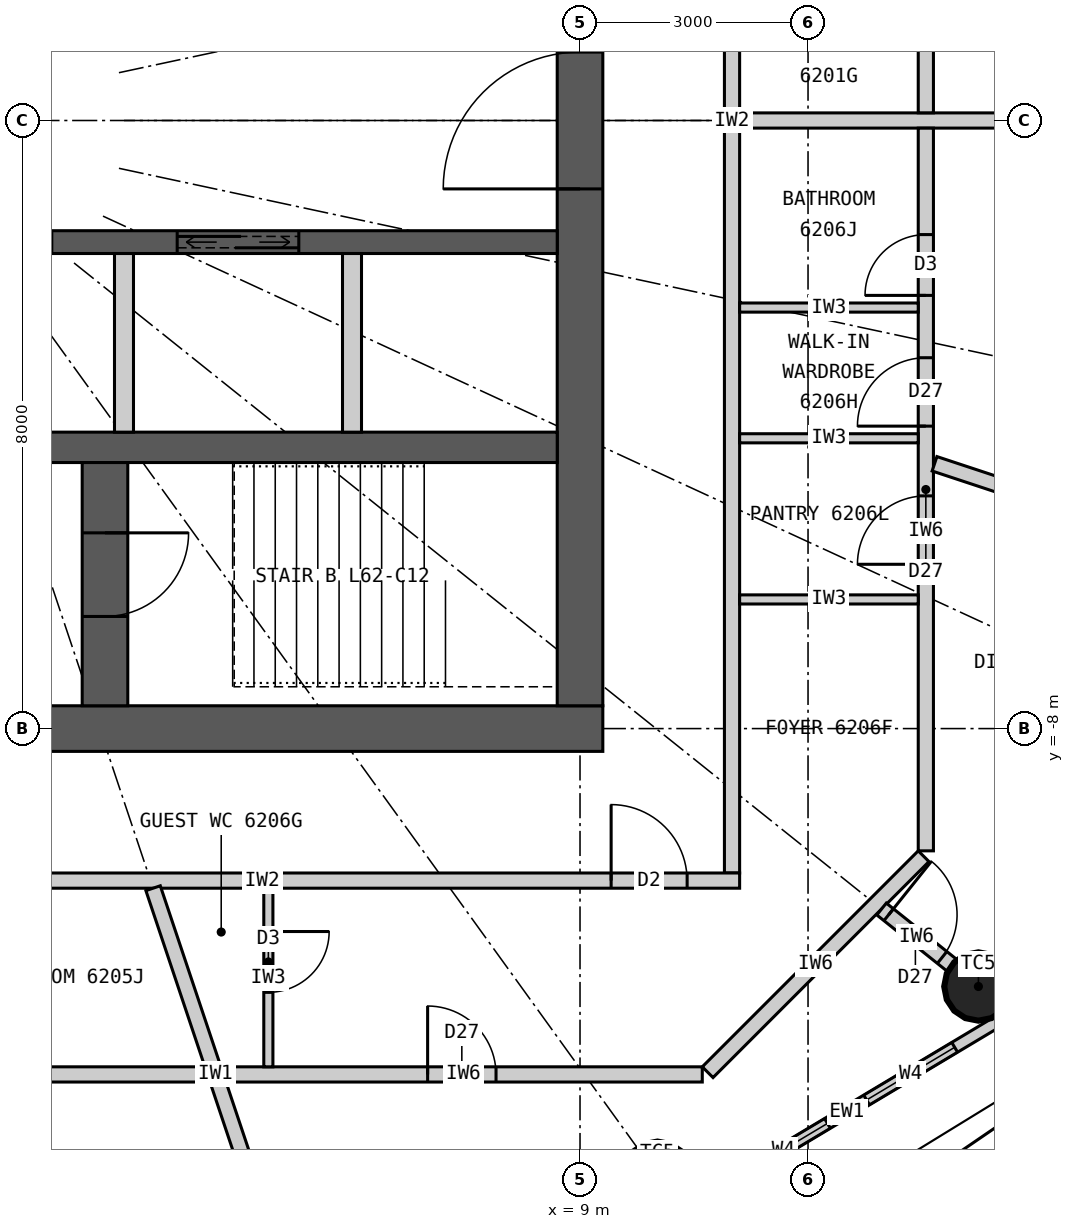
"""IFC4 building model, lengths in metres.
Left out: names, types, materials, properties, quantities, classifications, styles, units other than length and angle.
Written with IfcOpenShell. Run it as: python <this file> out.ifc"""

import sys

from ifc_helpers import new_model, si_unit, direction, frame, frame_2d, origin, origin_2d, place, context, subcontext, project, spatial, rectangle, circle, extrude, clip, halfspace, element, fill, save


model = new_model("IFC4")
c1 = context("Model", 3, precision=1e-05, world=origin(), true_north=direction((0.0, 1.0)))
c2 = subcontext(c1, "Body", "Model", "MODEL_VIEW")
j1 = project(units=[si_unit("LENGTHUNIT", "METRE"), si_unit("PLANEANGLEUNIT", "RADIAN")], contexts=[c1])
p1 = place(None, origin())
s1 = spatial("IfcSite", under=j1, at=p1, CompositionType="ELEMENT")
p2 = place(p1, origin())
s2 = spatial("IfcBuilding", under=s1, at=p2, CompositionType="ELEMENT")
p3 = place(p2, frame((0.0, 0.0, 229.2)))
s3 = spatial("IfcBuildingStorey", under=s2, at=p3, CompositionType="ELEMENT", Elevation=229.2)
for number, where, z_axis, x_axis in (
    (1, (10.019, -13.883, 0.0), (0.0, 0.0, 1.0), (1.0, 0.0, 0.0)),
    (2, (14.241, -11.393, 0.0), (0.0, 0.0, 1.0), (1.0, 0.0, 0.0)),
):
    element("IfcColumn", number, at=place(p3, frame(where, z_axis=z_axis, x_axis=x_axis)), inside=s3, PredefinedType="COLUMN", context=c2, shape_type="Clipping", body=[
        clip(extrude(circle(Radius=0.45, at=origin_2d()), origin(), (0.0, 0.0, 1.0), 3.3), halfspace(frame((0.0, 0.0, 2.25), z_axis=(0.0, 0.0, 1.0), x_axis=(1.0, 0.0, 0.0)), False)),
    ])
p4 = place(p3, frame((9.3, -8.0, 0.0), z_axis=(0.0, 0.0, 1.0), x_axis=(-1.0, 0.0, 0.0)))
e3 = element("IfcWall", 3, at=p4, inside=s3, PredefinedType="SHEAR", context=c2, shape_type="SweptSolid", body=[
    extrude(rectangle(XDim=18.6, YDim=0.6, at=frame_2d((9.3, 0.0))), origin(), (0.0, 0.0, 1.0), 3.3),
])
p5 = place(p4, frame((8.0, 0.0, 0.0)))
e4 = element("IfcOpeningElement", 4, at=p5, cuts=e3, PredefinedType="OPENING", context=c2, shape_type="SweptSolid", body=[
    extrude(rectangle(XDim=1.2, YDim=2.2, at=frame_2d((0.6, 1.1))), frame((0.0, 0.31, 0.0), z_axis=(0.0, -1.0, 0.0), x_axis=(1.0, 0.0, 0.0)), (0.0, 0.0, 1.0), 0.62),
])
p6 = place(p4, frame((15.6, 0.0, 0.0)))
e5 = element("IfcOpeningElement", 5, at=p6, cuts=e3, PredefinedType="OPENING", context=c2, shape_type="SweptSolid", body=[
    extrude(rectangle(XDim=0.9, YDim=2.2, at=frame_2d((0.45, 1.1))), frame((0.0, 0.31, 0.0), z_axis=(0.0, -1.0, 0.0), x_axis=(1.0, 0.0, 0.0)), (0.0, 0.0, 1.0), 0.62),
])
p7 = place(p3, frame((9.0, -7.7, 0.0), z_axis=(0.0, 0.0, 1.0), x_axis=(0.0, 1.0, 0.0)))
e6 = element("IfcWall", 6, at=p7, inside=s3, PredefinedType="SHEAR", context=c2, shape_type="SweptSolid", body=[
    extrude(rectangle(XDim=15.4, YDim=0.6, at=frame_2d((7.7, 0.0))), origin(), (0.0, 0.0, 1.0), 3.3),
])
p8 = place(p7, frame((6.8, 0.0, 0.0)))
e7 = element("IfcOpeningElement", 7, at=p8, cuts=e6, PredefinedType="OPENING", context=c2, shape_type="SweptSolid", body=[
    extrude(rectangle(XDim=1.8, YDim=2.2, at=frame_2d((0.9, 1.1))), frame((0.0, 0.31, 0.0), z_axis=(0.0, -1.0, 0.0), x_axis=(1.0, 0.0, 0.0)), (0.0, 0.0, 1.0), 0.62),
])
p9 = place(p3, frame((-8.7, -4.3, 0.0), z_axis=(0.0, 0.0, 1.0), x_axis=(1.0, 0.0, 0.0)))
e8 = element("IfcWall", 8, at=p9, inside=s3, PredefinedType="SHEAR", context=c2, shape_type="SweptSolid", body=[
    extrude(rectangle(XDim=17.4, YDim=0.4, at=frame_2d((8.7, 0.0))), origin(), (0.0, 0.0, 1.0), 3.3),
])
p10 = place(p3, frame((-8.7, -1.6, 0.0), z_axis=(0.0, 0.0, 1.0), x_axis=(1.0, 0.0, 0.0)))
e9 = element("IfcWall", 9, at=p10, inside=s3, PredefinedType="SHEAR", context=c2, shape_type="SweptSolid", body=[
    extrude(rectangle(XDim=17.4, YDim=0.3, at=frame_2d((8.7, 0.0))), origin(), (0.0, 0.0, 1.0), 3.3),
])
p11 = place(p10, frame((9.65, 0.0, 0.0)))
e10 = element("IfcOpeningElement", 10, at=p11, cuts=e9, PredefinedType="OPENING", context=c2, shape_type="SweptSolid", body=[
    extrude(rectangle(XDim=1.1, YDim=2.2, at=frame_2d((0.55, 1.1))), frame((0.0, 0.16, 0.0), z_axis=(0.0, -1.0, 0.0), x_axis=(1.0, 0.0, 0.0)), (0.0, 0.0, 1.0), 0.32),
])
p12 = place(p10, frame((12.4, 0.0, 0.0)))
e11 = element("IfcOpeningElement", 11, at=p12, cuts=e9, PredefinedType="OPENING", context=c2, shape_type="SweptSolid", body=[
    extrude(rectangle(XDim=1.6, YDim=2.4, at=frame_2d((0.8, 1.2))), frame((0.0, 0.16, 0.0), z_axis=(0.0, -1.0, 0.0), x_axis=(1.0, 0.0, 0.0)), (0.0, 0.0, 1.0), 0.32),
])
p13 = place(p10, frame((0.75, 0.0, 0.0)))
e12 = element("IfcOpeningElement", 12, at=p13, cuts=e9, PredefinedType="OPENING", context=c2, shape_type="SweptSolid", body=[
    extrude(rectangle(XDim=0.9, YDim=2.2, at=frame_2d((0.45, 1.1))), frame((0.0, 0.16, 0.0), z_axis=(0.0, -1.0, 0.0), x_axis=(1.0, 0.0, 0.0)), (0.0, 0.0, 1.0), 0.32),
])
p14 = place(p10, frame((5.25, 0.0, 0.0)))
e13 = element("IfcOpeningElement", 13, at=p14, cuts=e9, PredefinedType="OPENING", context=c2, shape_type="SweptSolid", body=[
    extrude(rectangle(XDim=0.9, YDim=2.2, at=frame_2d((0.45, 1.1))), frame((0.0, 0.16, 0.0), z_axis=(0.0, -1.0, 0.0), x_axis=(1.0, 0.0, 0.0)), (0.0, 0.0, 1.0), 0.32),
])
p15 = place(p3, frame((2.75, -7.7, 0.0), z_axis=(0.0, 0.0, 1.0), x_axis=(0.0, 1.0, 0.0)))
e14 = element("IfcWall", 14, at=p15, inside=s3, PredefinedType="SHEAR", context=c2, shape_type="SweptSolid", body=[
    extrude(rectangle(XDim=3.2, YDim=0.6, at=frame_2d((1.6, 0.0))), origin(), (0.0, 0.0, 1.0), 3.3),
])
p16 = place(p15, frame((1.175, 0.0, 0.0)))
e15 = element("IfcOpeningElement", 15, at=p16, cuts=e14, PredefinedType="OPENING", context=c2, shape_type="SweptSolid", body=[
    extrude(rectangle(XDim=1.1, YDim=2.2, at=frame_2d((0.55, 1.1))), frame((0.0, 0.31, 0.0), z_axis=(0.0, -1.0, 0.0), x_axis=(1.0, 0.0, 0.0)), (0.0, 0.0, 1.0), 0.62),
])
for number, where, z_axis, x_axis in (
    (16, (3.0, -4.1, 0.0), (0.0, 0.0, 1.0), (0.0, 1.0, 0.0)),
    (17, (6.0, -4.1, 0.0), (0.0, 0.0, 1.0), (0.0, 1.0, 0.0)),
):
    element("IfcWall", number, at=place(p3, frame(where, z_axis=z_axis, x_axis=x_axis)), inside=s3, PredefinedType="PARTITIONING", context=c2, shape_type="SweptSolid", body=[
        extrude(rectangle(XDim=2.35, YDim=0.25, at=frame_2d((1.175, 0.0))), origin(), (0.0, 0.0, 1.0), 3.3),
    ])
p17 = place(p3, frame((10.346, -14.336, 0.0), z_axis=(0.0, 0.0, 1.0), x_axis=(0.85822150553, 0.513279502265, 0.0)))
e18 = element("IfcWall", 18, at=p17, inside=s3, PredefinedType="ELEMENTEDWALL", context=c2, shape_type="SweptSolid", body=[
    extrude(rectangle(XDim=5.05, YDim=0.15, at=frame_2d((2.525, 0.0))), origin(), (0.0, 0.0, 1.0), 3.05),
])
p18 = place(p17, frame((0.875, 0.0, 0.9)))
e19 = element("IfcOpeningElement", 19, at=p18, cuts=e18, PredefinedType="OPENING", context=c2, shape_type="SweptSolid", body=[
    extrude(rectangle(XDim=1.35, YDim=1.9, at=frame_2d((0.675, 0.95))), frame((0.0, 0.085, 0.0), z_axis=(0.0, -1.0, 0.0), x_axis=(1.0, 0.0, 0.0)), (0.0, 0.0, 1.0), 0.17),
])
p19 = place(p17, frame((2.825, 0.0, 0.9)))
e20 = element("IfcOpeningElement", 20, at=p19, cuts=e18, PredefinedType="OPENING", context=c2, shape_type="SweptSolid", body=[
    extrude(rectangle(XDim=1.35, YDim=1.9, at=frame_2d((0.675, 0.95))), frame((0.0, 0.085, 0.0), z_axis=(0.0, -1.0, 0.0), x_axis=(1.0, 0.0, 0.0)), (0.0, 0.0, 1.0), 0.17),
])
p20 = place(p3, frame((11.0, -9.9, 0.0), z_axis=(0.0, 0.0, 1.0), x_axis=(0.0, 1.0, 0.0)))
e21 = element("IfcWall", 21, at=p20, inside=s3, PredefinedType="PARTITIONING", context=c2, shape_type="SweptSolid", body=[
    extrude(rectangle(XDim=19.8, YDim=0.2, at=frame_2d((9.9, 0.0))), origin(), (0.0, 0.0, 1.0), 3.05),
])
p21 = place(p20, frame((16.096, 0.0, 0.0)))
e22 = element("IfcOpeningElement", 22, at=p21, cuts=e21, PredefinedType="OPENING", context=c2, shape_type="SweptSolid", body=[
    extrude(rectangle(XDim=1.0, YDim=2.2, at=frame_2d((0.5, 1.1))), frame((0.0, 0.11, 0.0), z_axis=(0.0, -1.0, 0.0), x_axis=(1.0, 0.0, 0.0)), (0.0, 0.0, 1.0), 0.22),
])
p22 = place(p3, frame((11.1, -10.0, 0.0), z_axis=(0.0, 0.0, 1.0), x_axis=(-1.0, 0.0, 0.0)))
e23 = element("IfcWall", 23, at=p22, inside=s3, PredefinedType="PARTITIONING", context=c2, shape_type="SweptSolid", body=[
    extrude(rectangle(XDim=12.559, YDim=0.2, at=frame_2d((6.28, 0.0))), origin(), (0.0, 0.0, 1.0), 3.05),
])
p23 = place(p22, frame((0.691, 0.0, 0.0)))
e24 = element("IfcOpeningElement", 24, at=p23, cuts=e23, PredefinedType="OPENING", context=c2, shape_type="SweptSolid", body=[
    extrude(rectangle(XDim=1.0, YDim=2.2, at=frame_2d((0.5, 1.1))), frame((0.0, 0.11, 0.0), z_axis=(0.0, -1.0, 0.0), x_axis=(1.0, 0.0, 0.0)), (0.0, 0.0, 1.0), 0.22),
])
p24 = place(p3, frame((11.1, 0.0, 0.0), z_axis=(0.0, 0.0, 1.0), x_axis=(1.0, 0.0, 0.0)))
e25 = element("IfcWall", 25, at=p24, inside=s3, PredefinedType="PARTITIONING", context=c2, shape_type="SweptSolid", body=[
    extrude(rectangle(XDim=8.8, YDim=0.2, at=frame_2d((4.4, 0.0))), origin(), (0.0, 0.0, 1.0), 2.15),
])
p25 = place(p3, frame((3.383, -10.1, 0.0), z_axis=(0.0, 0.0, 1.0), x_axis=(0.317602151035, -0.948224063003, 0.0)))
e26 = element("IfcWall", 26, at=p25, inside=s3, PredefinedType="PARTITIONING", context=c2, shape_type="SweptSolid", body=[
    extrude(rectangle(XDim=5.168, YDim=0.2, at=frame_2d((2.584, 0.0))), origin(), (0.0, 0.0, 1.0), 2.15),
])
p26 = place(p3, frame((13.55, 0.101, 0.0), z_axis=(0.0, 0.0, 1.0), x_axis=(0.0, 1.0, 0.0)))
e27 = element("IfcWall", 27, at=p26, inside=s3, PredefinedType="PARTITIONING", context=c2, shape_type="SweptSolid", body=[
    extrude(rectangle(XDim=9.508, YDim=0.2, at=frame_2d((4.754, 0.0))), origin(), (0.0, 0.0, 1.0), 3.05),
])
p27 = place(p26, frame((4.32, 0.0, 0.0)))
e28 = element("IfcOpeningElement", 28, at=p27, cuts=e27, PredefinedType="OPENING", context=c2, shape_type="SweptSolid", body=[
    extrude(rectangle(XDim=0.9, YDim=2.1, at=frame_2d((0.45, 1.05))), frame((0.0, 0.11, 0.0), z_axis=(0.0, -1.0, 0.0), x_axis=(1.0, 0.0, 0.0)), (0.0, 0.0, 1.0), 0.22),
])
p28 = place(p3, frame((-6.364, -12.55, 0.0), z_axis=(0.0, 0.0, 1.0), x_axis=(1.0, 0.0, 0.0)))
e29 = element("IfcWall", 29, at=p28, inside=s3, PredefinedType="PARTITIONING", context=c2, shape_type="SweptSolid", body=[
    extrude(rectangle(XDim=10.446, YDim=0.2, at=frame_2d((5.223, 0.0))), origin(), (0.0, 0.0, 1.0), 3.05),
])
p29 = place(p28, frame((7.202, 0.0, 0.0)))
e30 = element("IfcOpeningElement", 30, at=p29, cuts=e29, PredefinedType="OPENING", context=c2, shape_type="SweptSolid", body=[
    extrude(rectangle(XDim=0.8, YDim=2.1, at=frame_2d((0.4, 1.05))), frame((0.0, 0.11, 0.0), z_axis=(0.0, -1.0, 0.0), x_axis=(1.0, 0.0, 0.0)), (0.0, 0.0, 1.0), 0.22),
])
p30 = place(p28, frame((3.895, 0.0, 0.0)))
e31 = element("IfcOpeningElement", 31, at=p30, cuts=e29, PredefinedType="OPENING", context=c2, shape_type="SweptSolid", body=[
    extrude(rectangle(XDim=0.9, YDim=2.1, at=frame_2d((0.45, 1.05))), frame((0.0, 0.11, 0.0), z_axis=(0.0, -1.0, 0.0), x_axis=(1.0, 0.0, 0.0)), (0.0, 0.0, 1.0), 0.22),
])
p31 = place(p3, frame((4.325, -12.55, 0.0), z_axis=(0.0, 0.0, 1.0), x_axis=(1.0, 0.0, 0.0)))
e32 = element("IfcWall", 32, at=p31, inside=s3, PredefinedType="PARTITIONING", context=c2, shape_type="SweptSolid", body=[
    extrude(rectangle(XDim=6.284, YDim=0.2, at=frame_2d((3.142, 0.0))), origin(), (0.0, 0.0, 1.0), 3.05),
])
p32 = place(p31, frame((2.67, 0.0, 0.0)))
e33 = element("IfcOpeningElement", 33, at=p32, cuts=e32, PredefinedType="OPENING", context=c2, shape_type="SweptSolid", body=[
    extrude(rectangle(XDim=0.9, YDim=2.1, at=frame_2d((0.45, 1.05))), frame((0.0, 0.11, 0.0), z_axis=(0.0, -1.0, 0.0), x_axis=(1.0, 0.0, 0.0)), (0.0, 0.0, 1.0), 0.22),
])
p33 = place(p3, frame((10.679, -12.521, 0.0), z_axis=(0.0, 0.0, 1.0), x_axis=(0.707106781187, 0.707106781187, 0.0)))
e34 = element("IfcWall", 34, at=p33, inside=s3, PredefinedType="PARTITIONING", context=c2, shape_type="SweptSolid", body=[
    extrude(rectangle(XDim=4.019, YDim=0.2, at=frame_2d((2.009, 0.0))), origin(), (0.0, 0.0, 1.0), 3.05),
])
p34 = place(p3, frame((13.55, -9.609, 0.0), z_axis=(0.0, 0.0, 1.0), x_axis=(0.0, 1.0, 0.0)))
e35 = element("IfcWall", 35, at=p34, inside=s3, PredefinedType="PARTITIONING", context=c2, shape_type="SweptSolid", body=[
    extrude(rectangle(XDim=9.508, YDim=0.2, at=frame_2d((4.754, 0.0))), origin(), (0.0, 0.0, 1.0), 3.05),
])
p35 = place(p34, frame((3.77, 0.0, 0.0)))
e36 = element("IfcOpeningElement", 36, at=p35, cuts=e35, PredefinedType="OPENING", context=c2, shape_type="SweptSolid", body=[
    extrude(rectangle(XDim=0.9, YDim=2.1, at=frame_2d((0.45, 1.05))), frame((0.0, 0.11, 0.0), z_axis=(0.0, -1.0, 0.0), x_axis=(1.0, 0.0, 0.0)), (0.0, 0.0, 1.0), 0.22),
])
p36 = place(p34, frame((5.588, 0.0, 0.0)))
e37 = element("IfcOpeningElement", 37, at=p36, cuts=e35, PredefinedType="OPENING", context=c2, shape_type="SweptSolid", body=[
    extrude(rectangle(XDim=0.9, YDim=2.1, at=frame_2d((0.45, 1.05))), frame((0.0, 0.11, 0.0), z_axis=(0.0, -1.0, 0.0), x_axis=(1.0, 0.0, 0.0)), (0.0, 0.0, 1.0), 0.22),
])
p37 = place(p34, frame((7.308, 0.0, 0.0)))
e38 = element("IfcOpeningElement", 38, at=p37, cuts=e35, PredefinedType="OPENING", context=c2, shape_type="SweptSolid", body=[
    extrude(rectangle(XDim=0.8, YDim=2.1, at=frame_2d((0.4, 1.05))), frame((0.0, 0.11, 0.0), z_axis=(0.0, -1.0, 0.0), x_axis=(1.0, 0.0, 0.0)), (0.0, 0.0, 1.0), 0.22),
])
p38 = place(p3, frame((12.968, -10.374, 0.0), z_axis=(0.0, 0.0, 1.0), x_axis=(0.780888968944, -0.624669847345, 0.0)))
e39 = element("IfcWall", 39, at=p38, inside=s3, PredefinedType="PARTITIONING", context=c2, shape_type="SweptSolid", body=[
    extrude(rectangle(XDim=1.181, YDim=0.2, at=frame_2d((0.591, 0.0))), origin(), (0.0, 0.0, 1.0), 2.15),
])
p39 = place(p38, frame((0.12, 0.0, 0.0)))
e40 = element("IfcOpeningElement", 40, at=p39, cuts=e39, PredefinedType="OPENING", context=c2, shape_type="SweptSolid", body=[
    extrude(rectangle(XDim=0.9, YDim=2.1, at=frame_2d((0.45, 1.05))), frame((0.0, 0.11, 0.0), z_axis=(0.0, -1.0, 0.0), x_axis=(1.0, 0.0, 0.0)), (0.0, 0.0, 1.0), 0.22),
])
p40 = place(p3, frame((13.664, -4.516, 0.0), z_axis=(0.0, 0.0, 1.0), x_axis=(0.949481375941, -0.313823384632, 0.0)))
e41 = element("IfcWall", 41, at=p40, inside=s3, PredefinedType="PARTITIONING", context=c2, shape_type="SweptSolid", body=[
    extrude(rectangle(XDim=5.638, YDim=0.2, at=frame_2d((2.819, 0.0))), origin(), (0.0, 0.0, 1.0), 3.05),
])
p41 = place(p40, frame((1.82, 0.0, 0.0)))
e42 = element("IfcOpeningElement", 42, at=p41, cuts=e41, PredefinedType="OPENING", context=c2, shape_type="SweptSolid", body=[
    extrude(rectangle(XDim=0.9, YDim=2.1, at=frame_2d((0.45, 1.05))), frame((0.0, 0.11, 0.0), z_axis=(0.0, -1.0, 0.0), x_axis=(1.0, 0.0, 0.0)), (0.0, 0.0, 1.0), 0.22),
])
p42 = place(p3, frame((4.899, -10.1, 0.0), z_axis=(0.0, 0.0, 1.0), x_axis=(0.0, -1.0, 0.0)))
e43 = element("IfcWall", 43, at=p42, inside=s3, PredefinedType="PARTITIONING", context=c2, shape_type="SweptSolid", body=[
    extrude(rectangle(XDim=2.35, YDim=0.12, at=frame_2d((1.175, 0.0))), origin(), (0.0, 0.0, 1.0), 3.05),
])
p43 = place(p42, frame((0.57, 0.0, 0.0)))
e44 = element("IfcOpeningElement", 44, at=p43, cuts=e43, PredefinedType="OPENING", context=c2, shape_type="SweptSolid", body=[
    extrude(rectangle(XDim=0.8, YDim=2.1, at=frame_2d((0.4, 1.05))), frame((0.0, 0.07, 0.0), z_axis=(0.0, -1.0, 0.0), x_axis=(1.0, 0.0, 0.0)), (0.0, 0.0, 1.0), 0.14),
])
for number, where, z_axis, x_axis in (
    (45, (11.1, -6.301, 0.0), (0.0, 0.0, 1.0), (1.0, 0.0, 0.0)),
    (46, (11.1, -4.181, 0.0), (0.0, 0.0, 1.0), (1.0, 0.0, 0.0)),
    (47, (11.1, -2.461, 0.0), (0.0, 0.0, 1.0), (1.0, 0.0, 0.0)),
):
    element("IfcWall", number, at=place(p3, frame(where, z_axis=z_axis, x_axis=x_axis)), inside=s3, PredefinedType="PARTITIONING", context=c2, shape_type="SweptSolid", body=[
        extrude(rectangle(XDim=2.35, YDim=0.12, at=frame_2d((1.175, 0.0))), origin(), (0.0, 0.0, 1.0), 3.05),
    ])
p44 = place(p18, origin())
e48 = element("IfcWindow", 48, at=p44, inside=s3, PartitioningType="SINGLE_PANEL", PredefinedType="WINDOW", context=c2, shape_type="SweptSolid", body=[
    extrude(rectangle(XDim=1.35, YDim=1.9, at=frame_2d((0.675, 0.95))), frame((0.0, 0.03, 0.0), z_axis=(0.0, -1.0, 0.0), x_axis=(1.0, 0.0, 0.0)), (0.0, 0.0, 1.0), 0.06),
])
fill(e19, e48)
p45 = place(p19, origin())
e49 = element("IfcWindow", 49, at=p45, inside=s3, PartitioningType="SINGLE_PANEL", PredefinedType="WINDOW", context=c2, shape_type="SweptSolid", body=[
    extrude(rectangle(XDim=1.35, YDim=1.9, at=frame_2d((0.675, 0.95))), frame((0.0, 0.03, 0.0), z_axis=(0.0, -1.0, 0.0), x_axis=(1.0, 0.0, 0.0)), (0.0, 0.0, 1.0), 0.06),
])
fill(e20, e49)
p46 = place(p23, origin())
e50 = element("IfcDoor", 50, at=p46, inside=s3, OperationType="SINGLE_SWING_RIGHT", PredefinedType="DOOR", context=c2, shape_type="SweptSolid", body=[
    extrude(rectangle(XDim=1.0, YDim=2.2, at=frame_2d((0.5, 1.1))), frame((0.0, 0.025, 0.0), z_axis=(0.0, -1.0, 0.0), x_axis=(1.0, 0.0, 0.0)), (0.0, 0.0, 1.0), 0.05),
])
fill(e24, e50)
p47 = place(p43, origin())
e51 = element("IfcDoor", 51, at=p47, inside=s3, OperationType="SINGLE_SWING_LEFT", PredefinedType="DOOR", context=c2, shape_type="SweptSolid", body=[
    extrude(rectangle(XDim=0.8, YDim=2.1, at=frame_2d((0.4, 1.05))), frame((0.0, 0.025, 0.0), z_axis=(0.0, -1.0, 0.0), x_axis=(1.0, 0.0, 0.0)), (0.0, 0.0, 1.0), 0.05),
])
fill(e44, e51)
p48 = place(p35, origin())
e52 = element("IfcDoor", 52, at=p48, inside=s3, OperationType="SINGLE_SWING_LEFT", PredefinedType="DOOR", context=c2, shape_type="SweptSolid", body=[
    extrude(rectangle(XDim=0.9, YDim=2.1, at=frame_2d((0.45, 1.05))), frame((0.0, 0.025, 0.0), z_axis=(0.0, -1.0, 0.0), x_axis=(1.0, 0.0, 0.0)), (0.0, 0.0, 1.0), 0.05),
])
fill(e36, e52)
p49 = place(p36, origin())
e53 = element("IfcDoor", 53, at=p49, inside=s3, OperationType="SINGLE_SWING_LEFT", PredefinedType="DOOR", context=c2, shape_type="SweptSolid", body=[
    extrude(rectangle(XDim=0.9, YDim=2.1, at=frame_2d((0.45, 1.05))), frame((0.0, 0.025, 0.0), z_axis=(0.0, -1.0, 0.0), x_axis=(1.0, 0.0, 0.0)), (0.0, 0.0, 1.0), 0.05),
])
fill(e37, e53)
p50 = place(p37, origin())
e54 = element("IfcDoor", 54, at=p50, inside=s3, OperationType="SINGLE_SWING_LEFT", PredefinedType="DOOR", context=c2, shape_type="SweptSolid", body=[
    extrude(rectangle(XDim=0.8, YDim=2.1, at=frame_2d((0.4, 1.05))), frame((0.0, 0.025, 0.0), z_axis=(0.0, -1.0, 0.0), x_axis=(1.0, 0.0, 0.0)), (0.0, 0.0, 1.0), 0.05),
])
fill(e38, e54)
p51 = place(p32, origin())
e55 = element("IfcDoor", 55, at=p51, inside=s3, OperationType="SINGLE_SWING_LEFT", PredefinedType="DOOR", context=c2, shape_type="SweptSolid", body=[
    extrude(rectangle(XDim=0.9, YDim=2.1, at=frame_2d((0.45, 1.05))), frame((0.0, 0.025, 0.0), z_axis=(0.0, -1.0, 0.0), x_axis=(1.0, 0.0, 0.0)), (0.0, 0.0, 1.0), 0.05),
])
fill(e33, e55)
p52 = place(p39, origin())
e56 = element("IfcDoor", 56, at=p52, inside=s3, OperationType="SINGLE_SWING_LEFT", PredefinedType="DOOR", context=c2, shape_type="SweptSolid", body=[
    extrude(rectangle(XDim=0.9, YDim=2.1, at=frame_2d((0.45, 1.05))), frame((0.0, 0.025, 0.0), z_axis=(0.0, -1.0, 0.0), x_axis=(1.0, 0.0, 0.0)), (0.0, 0.0, 1.0), 0.05),
])
fill(e40, e56)
p53 = place(p16, origin())
e57 = element("IfcDoor", 57, at=p53, inside=s3, OperationType="SINGLE_SWING_RIGHT", PredefinedType="DOOR", context=c2, shape_type="SweptSolid", body=[
    extrude(rectangle(XDim=1.1, YDim=2.2, at=frame_2d((0.55, 1.1))), frame((0.0, 0.025, 0.0), z_axis=(0.0, -1.0, 0.0), x_axis=(1.0, 0.0, 0.0)), (0.0, 0.0, 1.0), 0.05),
])
fill(e15, e57)
p54 = place(p12, origin())
e58 = element("IfcDoor", 58, at=p54, inside=s3, OperationType="DOUBLE_DOOR_SLIDING", PredefinedType="DOOR", context=c2, shape_type="SweptSolid", body=[
    extrude(rectangle(XDim=1.6, YDim=2.4, at=frame_2d((0.8, 1.2))), frame((0.0, 0.025, 0.0), z_axis=(0.0, -1.0, 0.0), x_axis=(1.0, 0.0, 0.0)), (0.0, 0.0, 1.0), 0.05),
])
fill(e11, e58)
p55 = place(p8, origin())
e59 = element("IfcDoor", 59, at=p55, inside=s3, OperationType="DOUBLE_DOOR_DOUBLE_SWING", PredefinedType="DOOR", context=c2, shape_type="SweptSolid", body=[
    extrude(rectangle(XDim=1.8, YDim=2.2, at=frame_2d((0.9, 1.1))), frame((0.0, 0.025, 0.0), z_axis=(0.0, -1.0, 0.0), x_axis=(1.0, 0.0, 0.0)), (0.0, 0.0, 1.0), 0.05),
])
fill(e7, e59)
save(model, sys.argv[1])
